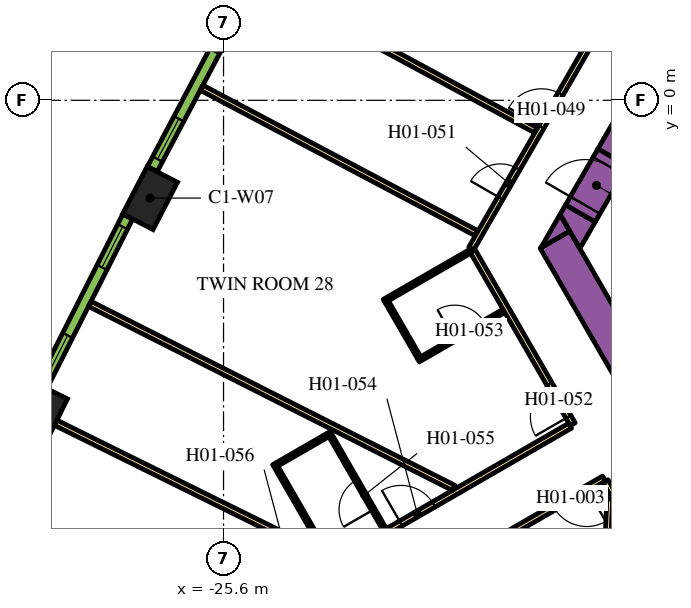
"""IFC4 building model, lengths in metres.
Left out: names, types, materials, properties, quantities, classifications, styles, units other than length and angle.
Written with IfcOpenShell. Run it as: python <this file> out.ifc"""

import sys

from ifc_helpers import new_model, si_unit, direction, frame, frame_2d, origin, origin_2d, place, context, subcontext, project, spatial, polyline, rectangle, outline, extrude, element, fill, save


model = new_model("IFC4")
c1 = context("Model", 3, precision=1e-05, world=origin(), true_north=direction((0.0, 1.0)))
c2 = subcontext(c1, "Body", "Model", "MODEL_VIEW")
j1 = project(units=[si_unit("LENGTHUNIT", "METRE"), si_unit("PLANEANGLEUNIT", "RADIAN")], contexts=[c1])
p1 = place(None, origin())
s1 = spatial("IfcSite", under=j1, at=p1, CompositionType="ELEMENT")
p2 = place(p1, origin())
s2 = spatial("IfcBuilding", under=s1, at=p2, CompositionType="ELEMENT")
p3 = place(p2, frame((0.0, 0.0, 27.6)))
s3 = spatial("IfcBuildingStorey", under=s2, at=p3, CompositionType="ELEMENT", Elevation=27.6)
for number, where, z_axis, x_axis in (
    (1, (-27.533, -2.572, 0.0), (0.0, 0.0, 1.0), (-0.459, -0.888, 0.0)),
    (2, (-30.421, -8.284, 0.0), (0.0, 0.0, 1.0), (-0.443, -0.897, 0.0)),
):
    element("IfcColumn", number, at=place(p3, frame(where, z_axis=z_axis, x_axis=x_axis)), inside=s3, PredefinedType="COLUMN", context=c2, shape_type="SweptSolid", body=[
        extrude(rectangle(XDim=1.4, YDim=0.9, at=origin_2d()), origin(), (0.0, 0.0, 1.0), 3.9),
    ])
p4 = place(p3, frame((-15.36, -1.503, 0.0), z_axis=(0.0, 0.0, 1.0), x_axis=(0.50000389221, 0.866023156604, 0.0)))
e3 = element("IfcWall", 3, at=p4, inside=s3, PredefinedType="SOLIDWALL", context=c2, shape_type="SweptSolid", body=[
    extrude(rectangle(XDim=21.0, YDim=0.9, at=frame_2d((10.5, 0.0))), origin(), (0.0, 0.0, 1.0), 3.9),
])
p5 = place(p3, frame((-12.134, -11.883, 0.0), z_axis=(0.0, 0.0, 1.0), x_axis=(-0.500005339912, 0.866022320763, 0.0)))
e4 = element("IfcWall", 4, at=p5, inside=s3, PredefinedType="SOLIDWALL", context=c2, shape_type="SweptSolid", body=[
    extrude(rectangle(XDim=9.488, YDim=0.9, at=frame_2d((4.744, 0.0))), origin(), (0.0, 0.0, 1.0), 3.9),
])
p6 = place(p3, origin())
e5 = element("IfcWall", 5, at=p6, inside=s3, PredefinedType="SOLIDWALL", context=c2, shape_type="SweptSolid", body=[
    extrude(outline(polyline([(-16.489, -3.44), (-17.251, -3.88), (-16.743, -3.0), (-16.489, -3.44)])), origin(), (0.0, 0.0, 1.0), 3.9),
])
e6 = element("IfcWall", 6, at=p6, inside=s3, PredefinedType="SOLIDWALL", context=c2, shape_type="SweptSolid", body=[
    extrude(outline(polyline([(-15.82, -3.201), (-16.223, -3.9), (-16.743, -3.0), (-16.599, -2.751), (-15.82, -3.201)])), origin(), (0.0, 0.0, 1.0), 3.9),
])
p7 = place(p3, frame((-16.209, -2.976, 0.0), z_axis=(0.0, 0.0, 1.0), x_axis=(0.499954529098, 0.86605165483, 0.0)))
e7 = element("IfcWall", 7, at=p7, inside=s3, PredefinedType="SOLIDWALL", context=c2, shape_type="SweptSolid", body=[
    extrude(rectangle(XDim=1.7, YDim=0.9, at=frame_2d((0.85, 0.0))), origin(), (0.0, 0.0, 1.0), 3.9),
])
p8 = place(p7, frame((0.25, 0.0, 0.0)))
e8 = element("IfcOpeningElement", 8, at=p8, cuts=e7, PredefinedType="OPENING", context=c2, shape_type="SweptSolid", body=[
    extrude(rectangle(XDim=1.2, YDim=2.1, at=frame_2d((0.6, 1.05))), frame((0.0, 0.46, 0.0), z_axis=(0.0, -1.0, 0.0), x_axis=(1.0, 0.0, 0.0)), (0.0, 0.0, 1.0), 0.92),
])
p9 = place(p3, frame((-19.081, -3.9, 0.0), z_axis=(0.0, 0.0, 1.0), x_axis=(0.499998313975, 0.866026377209, 0.0)))
e9 = element("IfcWall", 9, at=p9, inside=s3, PredefinedType="PARTITIONING", context=c2, shape_type="SweptSolid", body=[
    extrude(rectangle(XDim=25.766, YDim=0.15, at=frame_2d((12.883, 0.0))), origin(), (0.0, 0.0, 1.0), 2.75),
])
p10 = place(p9, frame((24.586, 0.0, 0.0)))
e10 = element("IfcOpeningElement", 10, at=p10, cuts=e9, PredefinedType="OPENING", context=c2, shape_type="SweptSolid", body=[
    extrude(rectangle(XDim=1.0, YDim=2.1, at=frame_2d((0.5, 1.05))), frame((0.0, 0.085, 0.0), z_axis=(0.0, -1.0, 0.0), x_axis=(1.0, 0.0, 0.0)), (0.0, 0.0, 1.0), 0.17),
])
p11 = place(p9, frame((16.196, 0.0, 0.0)))
e11 = element("IfcOpeningElement", 11, at=p11, cuts=e9, PredefinedType="OPENING", context=c2, shape_type="SweptSolid", body=[
    extrude(rectangle(XDim=1.0, YDim=2.1, at=frame_2d((0.5, 1.05))), frame((0.0, 0.085, 0.0), z_axis=(0.0, -1.0, 0.0), x_axis=(1.0, 0.0, 0.0)), (0.0, 0.0, 1.0), 0.17),
])
p12 = place(p9, frame((14.789, 0.0, 0.0)))
e12 = element("IfcOpeningElement", 12, at=p12, cuts=e9, PredefinedType="OPENING", context=c2, shape_type="SweptSolid", body=[
    extrude(rectangle(XDim=1.1, YDim=2.1, at=frame_2d((0.55, 1.05))), frame((0.0, 0.085, 0.0), z_axis=(0.0, -1.0, 0.0), x_axis=(1.0, 0.0, 0.0)), (0.0, 0.0, 1.0), 0.17),
])
p13 = place(p9, frame((3.698, 0.0, 0.0)))
e13 = element("IfcOpeningElement", 13, at=p13, cuts=e9, PredefinedType="OPENING", context=c2, shape_type="SweptSolid", body=[
    extrude(rectangle(XDim=1.0, YDim=2.1, at=frame_2d((0.5, 1.05))), frame((0.0, 0.085, 0.0), z_axis=(0.0, -1.0, 0.0), x_axis=(1.0, 0.0, 0.0)), (0.0, 0.0, 1.0), 0.17),
])
p14 = place(p9, frame((1.531, 0.0, 0.0)))
e14 = element("IfcOpeningElement", 14, at=p14, cuts=e9, PredefinedType="OPENING", context=c2, shape_type="SweptSolid", body=[
    extrude(rectangle(XDim=0.9, YDim=2.1, at=frame_2d((0.45, 1.05))), frame((0.0, 0.085, 0.0), z_axis=(0.0, -1.0, 0.0), x_axis=(1.0, 0.0, 0.0)), (0.0, 0.0, 1.0), 0.17),
])
p15 = place(p3, frame((-16.412, -8.523, 0.0), z_axis=(0.0, 0.0, 1.0), x_axis=(-0.500001929737, 0.866024289647, 0.0)))
e15 = element("IfcWall", 15, at=p15, inside=s3, PredefinedType="PARTITIONING", context=c2, shape_type="SweptSolid", body=[
    extrude(rectangle(XDim=5.268, YDim=0.15, at=frame_2d((2.634, 0.0))), origin(), (0.0, 0.0, 1.0), 2.75),
])
p16 = place(p15, frame((0.226, 0.0, 0.0)))
e16 = element("IfcOpeningElement", 16, at=p16, cuts=e15, PredefinedType="OPENING", context=c2, shape_type="SweptSolid", body=[
    extrude(rectangle(XDim=1.0, YDim=2.1, at=frame_2d((0.5, 1.05))), frame((0.0, 0.085, 0.0), z_axis=(0.0, -1.0, 0.0), x_axis=(1.0, 0.0, 0.0)), (0.0, 0.0, 1.0), 0.17),
])
p17 = place(p3, frame((-30.463, -16.635, 0.0), z_axis=(0.0, 0.0, 1.0), x_axis=(0.866022394896, 0.500005211512, 0.0)))
e17 = element("IfcWall", 17, at=p17, inside=s3, PredefinedType="PARTITIONING", context=c2, shape_type="SweptSolid", body=[
    extrude(rectangle(XDim=16.144, YDim=0.15, at=frame_2d((8.072, 0.0))), origin(), (0.0, 0.0, 1.0), 2.75),
])
p18 = place(p17, frame((11.004, 0.0, 0.0)))
e18 = element("IfcOpeningElement", 18, at=p18, cuts=e17, PredefinedType="OPENING", context=c2, shape_type="SweptSolid", body=[
    extrude(rectangle(XDim=1.0, YDim=2.1, at=frame_2d((0.5, 1.05))), frame((0.0, 0.085, 0.0), z_axis=(0.0, -1.0, 0.0), x_axis=(1.0, 0.0, 0.0)), (0.0, 0.0, 1.0), 0.17),
])
p19 = place(p17, frame((7.274, 0.0, 0.0)))
e19 = element("IfcOpeningElement", 19, at=p19, cuts=e17, PredefinedType="OPENING", context=c2, shape_type="SweptSolid", body=[
    extrude(rectangle(XDim=1.0, YDim=2.1, at=frame_2d((0.5, 1.05))), frame((0.0, 0.085, 0.0), z_axis=(0.0, -1.0, 0.0), x_axis=(1.0, 0.0, 0.0)), (0.0, 0.0, 1.0), 0.17),
])
p20 = place(p3, frame((-15.587, -9.952, 0.0), z_axis=(0.0, 0.0, 1.0), x_axis=(-0.866022197818, -0.500005552856, 0.0)))
e20 = element("IfcWall", 20, at=p20, inside=s3, PredefinedType="PARTITIONING", context=c2, shape_type="SweptSolid", body=[
    extrude(rectangle(XDim=16.224, YDim=0.15, at=frame_2d((8.112, 0.0))), origin(), (0.0, 0.0, 1.0), 2.75),
])
p21 = place(p20, frame((7.949, 0.0, 0.0)))
e21 = element("IfcOpeningElement", 21, at=p21, cuts=e20, PredefinedType="OPENING", context=c2, shape_type="SweptSolid", body=[
    extrude(rectangle(XDim=1.0, YDim=2.1, at=frame_2d((0.5, 1.05))), frame((0.0, 0.085, 0.0), z_axis=(0.0, -1.0, 0.0), x_axis=(1.0, 0.0, 0.0)), (0.0, 0.0, 1.0), 0.17),
])
p22 = place(p20, frame((0.525, 0.0, 0.0)))
e22 = element("IfcOpeningElement", 22, at=p22, cuts=e20, PredefinedType="OPENING", context=c2, shape_type="SweptSolid", body=[
    extrude(rectangle(XDim=1.0, YDim=2.1, at=frame_2d((0.5, 1.05))), frame((0.0, 0.085, 0.0), z_axis=(0.0, -1.0, 0.0), x_axis=(1.0, 0.0, 0.0)), (0.0, 0.0, 1.0), 0.17),
])
p23 = place(p3, frame((-12.918, -14.575, 0.0), z_axis=(0.0, 0.0, 1.0), x_axis=(-0.500009150678, 0.866020120573, 0.0)))
e23 = element("IfcWall", 23, at=p23, inside=s3, PredefinedType="PARTITIONING", context=c2, shape_type="SweptSolid", body=[
    extrude(rectangle(XDim=5.258, YDim=0.15, at=frame_2d((2.629, 0.0))), origin(), (0.0, 0.0, 1.0), 2.75),
])
p24 = place(p3, frame((-30.018, -8.483, 0.0), z_axis=(0.0, 0.0, 1.0), x_axis=(0.896544505264, -0.44295366584, 0.0)))
e24 = element("IfcWall", 24, at=p24, inside=s3, PredefinedType="PARTITIONING", context=c2, shape_type="SweptSolid", body=[
    extrude(rectangle(XDim=8.079, YDim=0.15, at=frame_2d((4.04, 0.0))), origin(), (0.0, 0.0, 1.0), 2.75),
])
p25 = place(p3, frame((-29.12, -5.356, 0.0), z_axis=(0.0, 0.0, 1.0), x_axis=(0.892401965553, -0.451241323327, 0.0)))
e25 = element("IfcWall", 25, at=p25, inside=s3, PredefinedType="PARTITIONING", context=c2, shape_type="SweptSolid", body=[
    extrude(rectangle(XDim=10.729, YDim=0.15, at=frame_2d((5.364, 0.0))), origin(), (0.0, 0.0, 1.0), 2.75),
])
p26 = place(p3, frame((-26.178, 0.331, 0.0), z_axis=(0.0, 0.0, 1.0), x_axis=(0.883908370409, -0.467660125221, 0.0)))
e26 = element("IfcWall", 26, at=p26, inside=s3, PredefinedType="PARTITIONING", context=c2, shape_type="SweptSolid", body=[
    extrude(rectangle(XDim=8.182, YDim=0.15, at=frame_2d((4.091, 0.0))), origin(), (0.0, 0.0, 1.0), 2.75),
])
p27 = place(p3, frame((-24.145, 2.871, 0.0), z_axis=(0.0, 0.0, 1.0), x_axis=(0.879551725039, -0.475803281809, 0.0)))
e27 = element("IfcWall", 27, at=p27, inside=s3, PredefinedType="PARTITIONING", context=c2, shape_type="SweptSolid", body=[
    extrude(rectangle(XDim=7.688, YDim=0.15, at=frame_2d((3.844, 0.0))), origin(), (0.0, 0.0, 1.0), 2.75),
])
p28 = place(p3, frame((-15.973, -22.109, 0.0), z_axis=(0.0, 0.0, 1.0), x_axis=(0.046191717129, 0.998932592955, 0.0)))
e28 = element("IfcWall", 28, at=p28, inside=s3, PredefinedType="PARTITIONING", context=c2, shape_type="SweptSolid", body=[
    extrude(rectangle(XDim=11.638, YDim=0.15, at=frame_2d((5.819, 0.0))), origin(), (0.0, 0.0, 1.0), 2.75),
])
p29 = place(p3, frame((-20.473, -6.84, 0.0), z_axis=(0.0, 0.0, 1.0), x_axis=(0.865997922154, 0.500047596559, 0.0)))
e29 = element("IfcWall", 29, at=p29, inside=s3, PredefinedType="PARTITIONING", context=c2, shape_type="SweptSolid", body=[
    extrude(rectangle(XDim=2.6, YDim=0.1, at=frame_2d((1.3, 0.0))), origin(), (0.0, 0.0, 1.0), 2.75),
])
p30 = place(p29, frame((1.1, 0.0, 0.0)))
e30 = element("IfcOpeningElement", 30, at=p30, cuts=e29, PredefinedType="OPENING", context=c2, shape_type="SweptSolid", body=[
    extrude(rectangle(XDim=0.9, YDim=2.1, at=frame_2d((0.45, 1.05))), frame((0.0, 0.06, 0.0), z_axis=(0.0, -1.0, 0.0), x_axis=(1.0, 0.0, 0.0)), (0.0, 0.0, 1.0), 0.12),
])
p31 = place(p3, frame((-20.455, -6.771, 0.0), z_axis=(0.0, 0.0, 1.0), x_axis=(-0.500062241894, 0.865989465428, 0.0)))
e31 = element("IfcWall", 31, at=p31, inside=s3, PredefinedType="PARTITIONING", context=c2, shape_type="SweptSolid", body=[
    extrude(rectangle(XDim=1.7, YDim=0.1, at=frame_2d((0.85, 0.0))), origin(), (0.0, 0.0, 1.0), 2.75),
])
p32 = place(p3, frame((-19.121, -3.981, 0.0), z_axis=(0.0, 0.0, 1.0), x_axis=(-0.866021400173, -0.500006934395, 0.0)))
e32 = element("IfcWall", 32, at=p32, inside=s3, PredefinedType="PARTITIONING", context=c2, shape_type="SweptSolid", body=[
    extrude(rectangle(XDim=2.6, YDim=0.1, at=frame_2d((1.3, 0.0))), origin(), (0.0, 0.0, 1.0), 2.75),
])
p33 = place(p3, frame((-21.36, -11.293, 0.0), z_axis=(0.0, 0.0, 1.0), x_axis=(-0.49997559174, 0.866039495442, 0.0)))
e33 = element("IfcWall", 33, at=p33, inside=s3, PredefinedType="PARTITIONING", context=c2, shape_type="SweptSolid", body=[
    extrude(rectangle(XDim=2.95, YDim=0.1, at=frame_2d((1.475, 0.0))), origin(), (0.0, 0.0, 1.0), 2.75),
])
p34 = place(p33, frame((0.6, 0.0, 0.0)))
e34 = element("IfcOpeningElement", 34, at=p34, cuts=e33, PredefinedType="OPENING", context=c2, shape_type="SweptSolid", body=[
    extrude(rectangle(XDim=0.9, YDim=2.1, at=frame_2d((0.45, 1.05))), frame((0.0, 0.06, 0.0), z_axis=(0.0, -1.0, 0.0), x_axis=(1.0, 0.0, 0.0)), (0.0, 0.0, 1.0), 0.12),
])
p35 = place(p3, frame((-22.853, -8.806, 0.0), z_axis=(0.0, 0.0, 1.0), x_axis=(-0.86601511528, -0.500017819788, 0.0)))
e35 = element("IfcWall", 35, at=p35, inside=s3, PredefinedType="PARTITIONING", context=c2, shape_type="SweptSolid", body=[
    extrude(rectangle(XDim=1.55, YDim=0.1, at=frame_2d((0.775, 0.0))), origin(), (0.0, 0.0, 1.0), 2.75),
])
p36 = place(p3, frame((-22.944, -11.85, 0.0), z_axis=(0.0, 0.0, 1.0), x_axis=(-0.499938597367, 0.866060851709, 0.0)))
e36 = element("IfcWall", 36, at=p36, inside=s3, PredefinedType="PARTITIONING", context=c2, shape_type="SweptSolid", body=[
    extrude(rectangle(XDim=2.64, YDim=0.1, at=frame_2d((1.32, 0.0))), origin(), (0.0, 0.0, 1.0), 2.75),
])
p37 = place(p3, frame((-25.138, 2.608, 0.0), z_axis=(0.0, 0.0, 1.0), x_axis=(-0.467629620899, -0.883924509026, 0.0)))
e37 = element("IfcWall", 37, at=p37, inside=s3, PredefinedType="SOLIDWALL", context=c2, shape_type="SweptSolid", body=[
    extrude(rectangle(XDim=4.998, YDim=0.29, at=frame_2d((2.499, 0.0))), origin(), (0.0, 0.0, 1.0), 3.65),
])
p38 = place(p37, frame((0.297, 0.0, 0.9)))
e38 = element("IfcOpeningElement", 38, at=p38, cuts=e37, PredefinedType="OPENING", context=c2, shape_type="SweptSolid", body=[
    extrude(rectangle(XDim=1.2, YDim=2.15, at=frame_2d((0.6, 1.075))), frame((0.0, 0.155, 0.0), z_axis=(0.0, -1.0, 0.0), x_axis=(1.0, 0.0, 0.0)), (0.0, 0.0, 1.0), 0.31),
])
p39 = place(p37, frame((3.501, 0.0, 0.9)))
e39 = element("IfcOpeningElement", 39, at=p39, cuts=e37, PredefinedType="OPENING", context=c2, shape_type="SweptSolid", body=[
    extrude(rectangle(XDim=1.2, YDim=2.15, at=frame_2d((0.6, 1.075))), frame((0.0, 0.155, 0.0), z_axis=(0.0, -1.0, 0.0), x_axis=(1.0, 0.0, 0.0)), (0.0, 0.0, 1.0), 0.31),
])
p40 = place(p3, frame((-28.122, -3.06, 0.0), z_axis=(0.0, 0.0, 1.0), x_axis=(-0.451233929645, -0.892405704115, 0.0)))
e40 = element("IfcWall", 40, at=p40, inside=s3, PredefinedType="SOLIDWALL", context=c2, shape_type="SweptSolid", body=[
    extrude(rectangle(XDim=4.998, YDim=0.29, at=frame_2d((2.499, 0.0))), origin(), (0.0, 0.0, 1.0), 3.65),
])
p41 = place(p40, frame((0.297, 0.0, 0.9)))
e41 = element("IfcOpeningElement", 41, at=p41, cuts=e40, PredefinedType="OPENING", context=c2, shape_type="SweptSolid", body=[
    extrude(rectangle(XDim=1.2, YDim=2.15, at=frame_2d((0.6, 1.075))), frame((0.0, 0.155, 0.0), z_axis=(0.0, -1.0, 0.0), x_axis=(1.0, 0.0, 0.0)), (0.0, 0.0, 1.0), 0.31),
])
p42 = place(p40, frame((3.501, 0.0, 0.9)))
e42 = element("IfcOpeningElement", 42, at=p42, cuts=e40, PredefinedType="OPENING", context=c2, shape_type="SweptSolid", body=[
    extrude(rectangle(XDim=1.2, YDim=2.15, at=frame_2d((0.6, 1.075))), frame((0.0, 0.155, 0.0), z_axis=(0.0, -1.0, 0.0), x_axis=(1.0, 0.0, 0.0)), (0.0, 0.0, 1.0), 0.31),
])
p43 = place(p8, origin())
e43 = element("IfcDoor", 43, at=p43, inside=s3, OperationType="SINGLE_SWING_LEFT", PredefinedType="DOOR", context=c2, shape_type="SweptSolid", body=[
    extrude(rectangle(XDim=1.2, YDim=2.1, at=frame_2d((0.6, 1.05))), frame((0.0, 0.025, 0.0), z_axis=(0.0, -1.0, 0.0), x_axis=(1.0, 0.0, 0.0)), (0.0, 0.0, 1.0), 0.05),
])
fill(e8, e43)
p44 = place(p22, origin())
e44 = element("IfcDoor", 44, at=p44, inside=s3, OperationType="SINGLE_SWING_LEFT", PredefinedType="DOOR", context=c2, shape_type="SweptSolid", body=[
    extrude(rectangle(XDim=1.0, YDim=2.1, at=frame_2d((0.5, 1.05))), frame((0.0, 0.025, 0.0), z_axis=(0.0, -1.0, 0.0), x_axis=(1.0, 0.0, 0.0)), (0.0, 0.0, 1.0), 0.05),
])
fill(e22, e44)
p45 = place(p13, origin())
e45 = element("IfcDoor", 45, at=p45, inside=s3, OperationType="SINGLE_SWING_LEFT", PredefinedType="DOOR", context=c2, shape_type="SweptSolid", body=[
    extrude(rectangle(XDim=1.0, YDim=2.1, at=frame_2d((0.5, 1.05))), frame((0.0, 0.025, 0.0), z_axis=(0.0, -1.0, 0.0), x_axis=(1.0, 0.0, 0.0)), (0.0, 0.0, 1.0), 0.05),
])
fill(e13, e45)
p46 = place(p14, origin())
e46 = element("IfcDoor", 46, at=p46, inside=s3, OperationType="SINGLE_SWING_LEFT", PredefinedType="DOOR", context=c2, shape_type="SweptSolid", body=[
    extrude(rectangle(XDim=0.9, YDim=2.1, at=frame_2d((0.45, 1.05))), frame((0.0, 0.025, 0.0), z_axis=(0.0, -1.0, 0.0), x_axis=(1.0, 0.0, 0.0)), (0.0, 0.0, 1.0), 0.05),
])
fill(e14, e46)
p47 = place(p16, origin())
e47 = element("IfcDoor", 47, at=p47, inside=s3, OperationType="SINGLE_SWING_LEFT", PredefinedType="DOOR", context=c2, shape_type="SweptSolid", body=[
    extrude(rectangle(XDim=1.0, YDim=2.1, at=frame_2d((0.5, 1.05))), frame((0.0, 0.025, 0.0), z_axis=(0.0, -1.0, 0.0), x_axis=(1.0, 0.0, 0.0)), (0.0, 0.0, 1.0), 0.05),
])
fill(e16, e47)
p48 = place(p30, origin())
e48 = element("IfcDoor", 48, at=p48, inside=s3, OperationType="SINGLE_SWING_LEFT", PredefinedType="DOOR", context=c2, shape_type="SweptSolid", body=[
    extrude(rectangle(XDim=0.9, YDim=2.1, at=frame_2d((0.45, 1.05))), frame((0.0, 0.025, 0.0), z_axis=(0.0, -1.0, 0.0), x_axis=(1.0, 0.0, 0.0)), (0.0, 0.0, 1.0), 0.05),
])
fill(e30, e48)
p49 = place(p18, origin())
e49 = element("IfcDoor", 49, at=p49, inside=s3, OperationType="SINGLE_SWING_RIGHT", PredefinedType="DOOR", context=c2, shape_type="SweptSolid", body=[
    extrude(rectangle(XDim=1.0, YDim=2.1, at=frame_2d((0.5, 1.05))), frame((0.0, 0.025, 0.0), z_axis=(0.0, -1.0, 0.0), x_axis=(1.0, 0.0, 0.0)), (0.0, 0.0, 1.0), 0.05),
])
fill(e18, e49)
p50 = place(p34, origin())
e50 = element("IfcDoor", 50, at=p50, inside=s3, OperationType="SINGLE_SWING_LEFT", PredefinedType="DOOR", context=c2, shape_type="SweptSolid", body=[
    extrude(rectangle(XDim=0.9, YDim=2.1, at=frame_2d((0.45, 1.05))), frame((0.0, 0.025, 0.0), z_axis=(0.0, -1.0, 0.0), x_axis=(1.0, 0.0, 0.0)), (0.0, 0.0, 1.0), 0.05),
])
fill(e34, e50)
p51 = place(p39, origin())
e51 = element("IfcWindow", 51, at=p51, inside=s3, PartitioningType="DOUBLE_PANEL_VERTICAL", PredefinedType="WINDOW", context=c2, shape_type="SweptSolid", body=[
    extrude(rectangle(XDim=1.2, YDim=2.15, at=frame_2d((0.6, 1.075))), frame((0.0, 0.015, 0.0), z_axis=(0.0, -1.0, 0.0), x_axis=(1.0, 0.0, 0.0)), (0.0, 0.0, 1.0), 0.06),
])
fill(e39, e51)
p52 = place(p41, origin())
e52 = element("IfcWindow", 52, at=p52, inside=s3, PartitioningType="DOUBLE_PANEL_VERTICAL", PredefinedType="WINDOW", context=c2, shape_type="SweptSolid", body=[
    extrude(rectangle(XDim=1.2, YDim=2.15, at=frame_2d((0.6, 1.075))), frame((0.0, 0.015, 0.0), z_axis=(0.0, -1.0, 0.0), x_axis=(1.0, 0.0, 0.0)), (0.0, 0.0, 1.0), 0.06),
])
fill(e41, e52)
p53 = place(p42, origin())
e53 = element("IfcWindow", 53, at=p53, inside=s3, PartitioningType="DOUBLE_PANEL_VERTICAL", PredefinedType="WINDOW", context=c2, shape_type="SweptSolid", body=[
    extrude(rectangle(XDim=1.2, YDim=2.15, at=frame_2d((0.6, 1.075))), frame((0.0, 0.015, 0.0), z_axis=(0.0, -1.0, 0.0), x_axis=(1.0, 0.0, 0.0)), (0.0, 0.0, 1.0), 0.06),
])
fill(e42, e53)
save(model, sys.argv[1])
